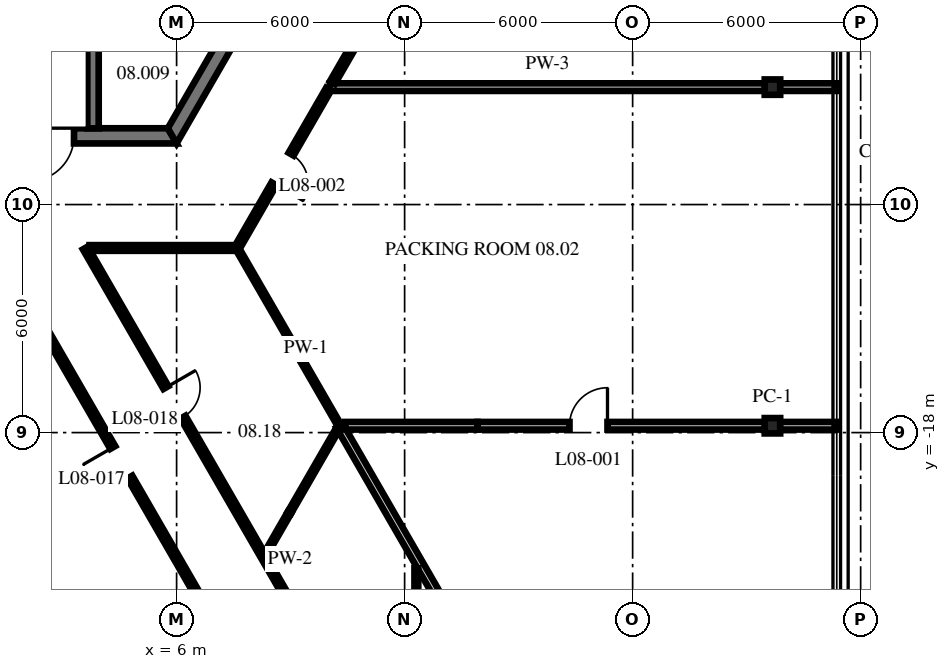
"""IFC4 building model, lengths in metres.
Left out: names, types, materials, properties, quantities, classifications, styles, units other than length and angle.
Written with IfcOpenShell. Run it as: python <this file> out.ifc"""

import sys

from ifc_helpers import new_model, si_unit, direction, frame, frame_2d, origin, origin_2d, place, context, subcontext, project, spatial, polyline, rectangle, i_section, outline, extrude, source, transform, mapped, element, fill, save


model = new_model("IFC4")
c1 = context("Model", 3, precision=1e-05, world=origin(), true_north=direction((0.0, 1.0)))
c2 = subcontext(c1, "Body", "Model", "MODEL_VIEW")
j1 = project(units=[si_unit("LENGTHUNIT", "METRE"), si_unit("PLANEANGLEUNIT", "RADIAN")], contexts=[c1])
p1 = place(None, origin())
s1 = spatial("IfcSite", under=j1, at=p1, CompositionType="ELEMENT")
p2 = place(p1, origin())
s2 = spatial("IfcBuilding", under=s1, at=p2, CompositionType="ELEMENT")
p3 = place(p2, frame((0.0, 0.0, 37.5)))
s3 = spatial("IfcBuildingStorey", under=s2, at=p3, CompositionType="ELEMENT", Elevation=37.5)
m1 = source(origin(), c2, "Body", "SweptSolid", [
    extrude(i_section(OverallWidth=0.404, OverallDepth=0.406, WebThickness=0.027, FlangeThickness=0.044, at=origin_2d()), origin(), (0.0, 0.0, 1.0), 4.3),
])
for number, where, z_axis, x_axis in (
    (1, (21.679, -17.82, 0.0), (0.0, 0.0, 1.0), (0.0, 1.0, 0.0)),
    (2, (21.679, -8.91, 0.0), (0.0, 0.0, 1.0), (0.0, 1.0, 0.0)),
):
    element("IfcColumn", number, at=place(p3, frame(where, z_axis=z_axis, x_axis=x_axis)), inside=s3, PredefinedType="COLUMN", context=c2, shape_type="MappedRepresentation", body=[
        mapped(m1, transform((0.0, 0.0, 0.0), scale=1.0)),
    ])
m2 = source(origin(), c2, "Body", "SweptSolid", [
    extrude(outline(polyline([(-0.115, -0.2), (11.885, -0.2), (11.654, 0.2), (0.115, 0.2), (-0.115, -0.2)])), origin(), (0.0, 0.0, 1.0), 4.1),
])
p4 = place(p3, frame((-5.885, -10.192, 0.0), z_axis=(0.0, 0.0, 1.0), x_axis=(1.0, 0.0, 0.0)))
e3 = element("IfcWall", 3, at=p4, inside=s3, PredefinedType="SHEAR", context=c2, shape_type="MappedRepresentation", body=[
    mapped(m2, transform((0.0, 0.0, 0.0), scale=1.0)),
])
p5 = place(p4, frame((7.985, 0.0, 0.0)))
e4 = element("IfcOpeningElement", 4, at=p5, cuts=e3, PredefinedType="OPENING", context=c2, shape_type="SweptSolid", body=[
    extrude(rectangle(XDim=1.2, YDim=2.1, at=frame_2d((0.6, 1.05))), frame((0.0, 0.21, 0.0), z_axis=(0.0, -1.0, 0.0), x_axis=(1.0, 0.0, 0.0)), (0.0, 0.0, 1.0), 0.42),
])
p6 = place(p3, frame((5.885, -10.192, 0.0), z_axis=(0.0, 0.0, 1.0), x_axis=(0.499996592174, 0.866027371285, 0.0)))
e5 = element("IfcWall", 5, at=p6, inside=s3, PredefinedType="SHEAR", context=c2, shape_type="MappedRepresentation", body=[
    mapped(m2, transform((0.0, 0.0, 0.0), scale=1.0)),
])
p7 = place(p6, frame((3.665, 0.0, 0.0)))
e6 = element("IfcOpeningElement", 6, at=p7, cuts=e5, PredefinedType="OPENING", context=c2, shape_type="SweptSolid", body=[
    extrude(rectangle(XDim=1.2, YDim=2.1, at=frame_2d((0.6, 1.05))), frame((0.0, 0.21, 0.0), z_axis=(0.0, -1.0, 0.0), x_axis=(1.0, 0.0, 0.0)), (0.0, 0.0, 1.0), 0.42),
])
m3 = source(origin(), c2, "Body", "SweptSolid", [
    extrude(outline(polyline([(3.8, -0.15), (-0.004, -0.15), (-0.004, 0.15), (3.8, 0.15), (3.8, -0.15)])), origin(), (0.0, 0.0, 1.0), 4.1),
])
p8 = place(p3, frame((3.8, -9.99, 0.0), z_axis=(0.0, 0.0, 1.0), x_axis=(0.0, 1.0, 0.0)))
e7 = element("IfcWall", 7, at=p8, inside=s3, PredefinedType="SHEAR", context=c2, shape_type="MappedRepresentation", body=[
    mapped(m3, transform((0.0, 0.0, 0.0), scale=1.0)),
])
p9 = place(p3, frame((1.289, -13.142, 0.0), z_axis=(0.0, 0.0, 1.0), x_axis=(0.500002274473, -0.866024090613, 0.0)))
e8 = element("IfcWall", 8, at=p9, inside=s3, PredefinedType="PARTITIONING", context=c2, shape_type="SweptSolid", body=[
    extrude(rectangle(XDim=19.385, YDim=0.15, at=frame_2d((9.692, 0.0))), origin(), (0.0, 0.0, 1.0), 4.1),
])
p10 = place(p9, frame((6.062, 0.0, 0.0)))
e9 = element("IfcOpeningElement", 9, at=p10, cuts=e8, PredefinedType="OPENING", context=c2, shape_type="SweptSolid", body=[
    extrude(rectangle(XDim=0.9, YDim=2.1, at=frame_2d((0.45, 1.05))), frame((0.0, 0.085, 0.0), z_axis=(0.0, -1.0, 0.0), x_axis=(1.0, 0.0, 0.0)), (0.0, 0.0, 1.0), 0.17),
])
p11 = place(p9, frame((15.05, 0.0, 0.0)))
e10 = element("IfcOpeningElement", 10, at=p11, cuts=e8, PredefinedType="OPENING", context=c2, shape_type="SweptSolid", body=[
    extrude(rectangle(XDim=0.9, YDim=2.1, at=frame_2d((0.45, 1.05))), frame((0.0, 0.085, 0.0), z_axis=(0.0, -1.0, 0.0), x_axis=(1.0, 0.0, 0.0)), (0.0, 0.0, 1.0), 0.17),
])
p12 = place(p3, frame((3.598, -13.142, 0.0), z_axis=(0.0, 0.0, 1.0), x_axis=(0.499992232847, -0.866029888106, 0.0)))
e11 = element("IfcWall", 11, at=p12, inside=s3, PredefinedType="PARTITIONING", context=c2, shape_type="SweptSolid", body=[
    extrude(rectangle(XDim=19.558, YDim=0.15, at=frame_2d((9.779, 0.0))), origin(), (0.0, 0.0, 1.0), 4.1),
])
p13 = place(p12, frame((4.241, 0.0, 0.0)))
e12 = element("IfcOpeningElement", 12, at=p13, cuts=e11, PredefinedType="OPENING", context=c2, shape_type="SweptSolid", body=[
    extrude(rectangle(XDim=0.9, YDim=2.1, at=frame_2d((0.45, 1.05))), frame((0.0, 0.085, 0.0), z_axis=(0.0, -1.0, 0.0), x_axis=(1.0, 0.0, 0.0)), (0.0, 0.0, 1.0), 0.17),
])
p14 = place(p12, frame((12.972, 0.0, 0.0)))
e13 = element("IfcOpeningElement", 13, at=p14, cuts=e11, PredefinedType="OPENING", context=c2, shape_type="SweptSolid", body=[
    extrude(rectangle(XDim=0.9, YDim=2.1, at=frame_2d((0.45, 1.05))), frame((0.0, 0.085, 0.0), z_axis=(0.0, -1.0, 0.0), x_axis=(1.0, 0.0, 0.0)), (0.0, 0.0, 1.0), 0.17),
])
p15 = place(p12, frame((18.018, 0.0, 0.0)))
e14 = element("IfcOpeningElement", 14, at=p15, cuts=e11, PredefinedType="OPENING", context=c2, shape_type="SweptSolid", body=[
    extrude(rectangle(XDim=0.9, YDim=2.1, at=frame_2d((0.45, 1.05))), frame((0.0, 0.085, 0.0), z_axis=(0.0, -1.0, 0.0), x_axis=(1.0, 0.0, 0.0)), (0.0, 0.0, 1.0), 0.17),
])
p16 = place(p3, frame((7.588, -13.142, 0.0), z_axis=(0.0, 0.0, 1.0), x_axis=(0.499998380488, -0.866026338808, 0.0)))
e15 = element("IfcWall", 15, at=p16, inside=s3, PredefinedType="PARTITIONING", context=c2, shape_type="SweptSolid", body=[
    extrude(rectangle(XDim=5.361, YDim=0.1, at=frame_2d((2.681, 0.0))), origin(), (0.0, 0.0, 1.0), 4.1),
])
p17 = place(p3, frame((10.288, -17.82, 0.0), z_axis=(0.0, 0.0, 1.0), x_axis=(0.500008633047, -0.866020419435, 0.0)))
e16 = element("IfcWall", 16, at=p17, inside=s3, PredefinedType="PARTITIONING", context=c2, shape_type="SweptSolid", body=[
    extrude(rectangle(XDim=13.219, YDim=0.2, at=frame_2d((6.609, 0.0))), origin(), (0.0, 0.0, 1.0), 4.1),
])
p18 = place(p3, frame((10.438, -17.82, 0.0), z_axis=(0.0, 0.0, 1.0), x_axis=(1.0, 0.0, 0.0)))
e17 = element("IfcWall", 17, at=p18, inside=s3, PredefinedType="PARTITIONING", context=c2, shape_type="SweptSolid", body=[
    extrude(rectangle(XDim=3.479, YDim=0.2, at=frame_2d((1.74, 0.0))), origin(), (0.0, 0.0, 1.0), 4.1),
])
m4 = source(origin(), c2, "Body", "SweptSolid", [
    extrude(rectangle(XDim=7.568, YDim=0.2, at=frame_2d((3.784, 0.0))), origin(), (0.0, 0.0, 1.0), 3.488),
])
p19 = place(p3, frame((13.918, -17.82, 0.0), z_axis=(0.0, 0.0, 1.0), x_axis=(1.0, 0.0, 0.0)))
e18 = element("IfcWall", 18, at=p19, inside=s3, PredefinedType="PARTITIONING", context=c2, shape_type="MappedRepresentation", body=[
    mapped(m4, transform((0.0, 0.0, 0.0), scale=1.0)),
])
p20 = place(p19, frame((2.42, 0.0, 0.0)))
e19 = element("IfcOpeningElement", 19, at=p20, cuts=e18, PredefinedType="OPENING", context=c2, shape_type="SweptSolid", body=[
    extrude(rectangle(XDim=1.0, YDim=2.1, at=frame_2d((0.5, 1.05))), frame((0.0, 0.11, 0.0), z_axis=(0.0, -1.0, 0.0), x_axis=(1.0, 0.0, 0.0)), (0.0, 0.0, 1.0), 0.22),
])
m5 = source(origin(), c2, "Body", "SweptSolid", [
    extrude(rectangle(XDim=1.499, YDim=0.2, at=frame_2d((0.749, 0.0))), origin(), (0.0, 0.0, 1.0), 4.1),
])
p21 = place(p3, frame((21.873, -17.82, 0.0), z_axis=(0.0, 0.0, 1.0), x_axis=(1.0, 0.0, 0.0)))
e20 = element("IfcWall", 20, at=p21, inside=s3, PredefinedType="PARTITIONING", context=c2, shape_type="MappedRepresentation", body=[
    mapped(m5, transform((0.0, 0.0, 0.0), scale=1.0)),
])
p22 = place(p3, frame((3.708, -13.142, 0.0), z_axis=(0.0, 0.0, 1.0), x_axis=(1.0, 0.0, 0.0)))
e21 = element("IfcWall", 21, at=p22, inside=s3, PredefinedType="PARTITIONING", context=c2, shape_type="SweptSolid", body=[
    extrude(rectangle(XDim=3.859, YDim=0.15, at=frame_2d((1.93, 0.0))), origin(), (0.0, 0.0, 1.0), 4.1),
])
m6 = source(origin(), c2, "Body", "SweptSolid", [
    extrude(rectangle(XDim=11.455, YDim=0.2, at=frame_2d((5.728, 0.0))), origin(), (0.0, 0.0, 1.0), 3.343),
])
p23 = place(p3, frame((10.031, -8.91, 0.0), z_axis=(0.0, 0.0, 1.0), x_axis=(1.0, 0.0, 0.0)))
e22 = element("IfcWall", 22, at=p23, inside=s3, PredefinedType="PARTITIONING", context=c2, shape_type="MappedRepresentation", body=[
    mapped(m6, transform((0.0, 0.0, 0.0), scale=1.0)),
])
p24 = place(p3, frame((21.873, -8.91, 0.0), z_axis=(0.0, 0.0, 1.0), x_axis=(1.0, 0.0, 0.0)))
e23 = element("IfcWall", 23, at=p24, inside=s3, PredefinedType="PARTITIONING", context=c2, shape_type="MappedRepresentation", body=[
    mapped(m5, transform((0.0, 0.0, 0.0), scale=1.0)),
])
m7 = source(origin(), c2, "Body", "SweptSolid", [
    extrude(rectangle(XDim=1.259, YDim=0.1, at=frame_2d((0.629, 0.0))), origin(), (0.0, 0.0, 1.0), 3.488),
])
p25 = place(p3, frame((8.339, -21.197, 0.0), z_axis=(0.0, 0.0, 1.0), x_axis=(0.499935087192, 0.866062877968, 0.0)))
e24 = element("IfcWall", 24, at=p25, inside=s3, PredefinedType="PARTITIONING", context=c2, shape_type="MappedRepresentation", body=[
    mapped(m7, transform((0.0, 0.0, 0.0), scale=1.0)),
])
p26 = place(p3, frame((8.968, -20.107, 0.0), z_axis=(0.0, 0.0, 1.0), x_axis=(0.500066192889, 0.865987183929, 0.0)))
e25 = element("IfcWall", 25, at=p26, inside=s3, PredefinedType="PARTITIONING", context=c2, shape_type="SweptSolid", body=[
    extrude(rectangle(XDim=2.521, YDim=0.1, at=frame_2d((1.26, 0.0))), origin(), (0.0, 0.0, 1.0), 4.1),
])
p27 = place(p3, frame((7.603, -13.116, 0.0), z_axis=(0.0, 0.0, 1.0), x_axis=(0.500011970786, 0.866018492338, 0.0)))
e26 = element("IfcWall", 26, at=p27, inside=s3, PredefinedType="PARTITIONING", context=c2, shape_type="SweptSolid", body=[
    extrude(rectangle(XDim=4.793, YDim=0.15, at=frame_2d((2.397, 0.0))), origin(), (0.0, 0.0, 1.0), 4.1),
])
p28 = place(p27, frame((1.92, 0.0, 0.0)))
e27 = element("IfcOpeningElement", 27, at=p28, cuts=e26, PredefinedType="OPENING", context=c2, shape_type="SweptSolid", body=[
    extrude(rectangle(XDim=0.9, YDim=2.1, at=frame_2d((0.45, 1.05))), frame((0.0, 0.085, 0.0), z_axis=(0.0, -1.0, 0.0), x_axis=(1.0, 0.0, 0.0)), (0.0, 0.0, 1.0), 0.17),
])
p29 = place(p3, frame((10.1, -8.792, 0.0), z_axis=(0.0, 0.0, 1.0), x_axis=(0.499985875816, 0.866033558232, 0.0)))
e28 = element("IfcWall", 28, at=p29, inside=s3, PredefinedType="PARTITIONING", context=c2, shape_type="SweptSolid", body=[
    extrude(rectangle(XDim=10.082, YDim=0.15, at=frame_2d((5.041, 0.0))), origin(), (0.0, 0.0, 1.0), 4.1),
])
p30 = place(p3, frame((12.309, -28.04, 0.0), z_axis=(0.0, 0.0, 1.0), x_axis=(0.0, 1.0, 0.0)))
e29 = element("IfcWall", 29, at=p30, inside=s3, PredefinedType="PARTITIONING", context=c2, shape_type="SweptSolid", body=[
    extrude(rectangle(XDim=6.47, YDim=0.1, at=frame_2d((3.235, 0.0))), origin(), (0.0, 0.0, 1.0), 4.1),
])
p31 = place(p5, frame((1.2, 0.0, 0.0), z_axis=(0.0, 0.0, 1.0), x_axis=(-1.0, 0.0, 0.0)))
e30 = element("IfcDoor", 30, at=p31, inside=s3, OperationType="SINGLE_SWING_RIGHT", PredefinedType="DOOR", context=c2, shape_type="SweptSolid", body=[
    extrude(rectangle(XDim=1.2, YDim=2.1, at=frame_2d((0.6, 1.05))), frame((0.0, 0.025, 0.0), z_axis=(0.0, -1.0, 0.0), x_axis=(1.0, 0.0, 0.0)), (0.0, 0.0, 1.0), 0.05),
])
fill(e4, e30)
p32 = place(p20, origin())
e31 = element("IfcDoor", 31, at=p32, inside=s3, OperationType="SINGLE_SWING_LEFT", PredefinedType="DOOR", context=c2, shape_type="SweptSolid", body=[
    extrude(rectangle(XDim=1.0, YDim=2.1, at=frame_2d((0.5, 1.05))), frame((0.0, 0.025, 0.0), z_axis=(0.0, -1.0, 0.0), x_axis=(1.0, 0.0, 0.0)), (0.0, 0.0, 1.0), 0.05),
])
fill(e19, e31)
p33 = place(p28, origin())
e32 = element("IfcDoor", 32, at=p33, inside=s3, OperationType="SINGLE_SWING_RIGHT", PredefinedType="DOOR", context=c2, shape_type="SweptSolid", body=[
    extrude(rectangle(XDim=0.9, YDim=2.1, at=frame_2d((0.45, 1.05))), frame((0.0, 0.025, 0.0), z_axis=(0.0, -1.0, 0.0), x_axis=(1.0, 0.0, 0.0)), (0.0, 0.0, 1.0), 0.05),
])
fill(e27, e32)
p34 = place(p10, origin())
e33 = element("IfcDoor", 33, at=p34, inside=s3, OperationType="SINGLE_SWING_RIGHT", PredefinedType="DOOR", context=c2, shape_type="SweptSolid", body=[
    extrude(rectangle(XDim=0.9, YDim=2.1, at=frame_2d((0.45, 1.05))), frame((0.0, 0.025, 0.0), z_axis=(0.0, -1.0, 0.0), x_axis=(1.0, 0.0, 0.0)), (0.0, 0.0, 1.0), 0.05),
])
fill(e9, e33)
p35 = place(p13, origin())
e34 = element("IfcDoor", 34, at=p35, inside=s3, OperationType="SINGLE_SWING_LEFT", PredefinedType="DOOR", context=c2, shape_type="SweptSolid", body=[
    extrude(rectangle(XDim=0.9, YDim=2.1, at=frame_2d((0.45, 1.05))), frame((0.0, 0.025, 0.0), z_axis=(0.0, -1.0, 0.0), x_axis=(1.0, 0.0, 0.0)), (0.0, 0.0, 1.0), 0.05),
])
fill(e12, e34)
save(model, sys.argv[1])
